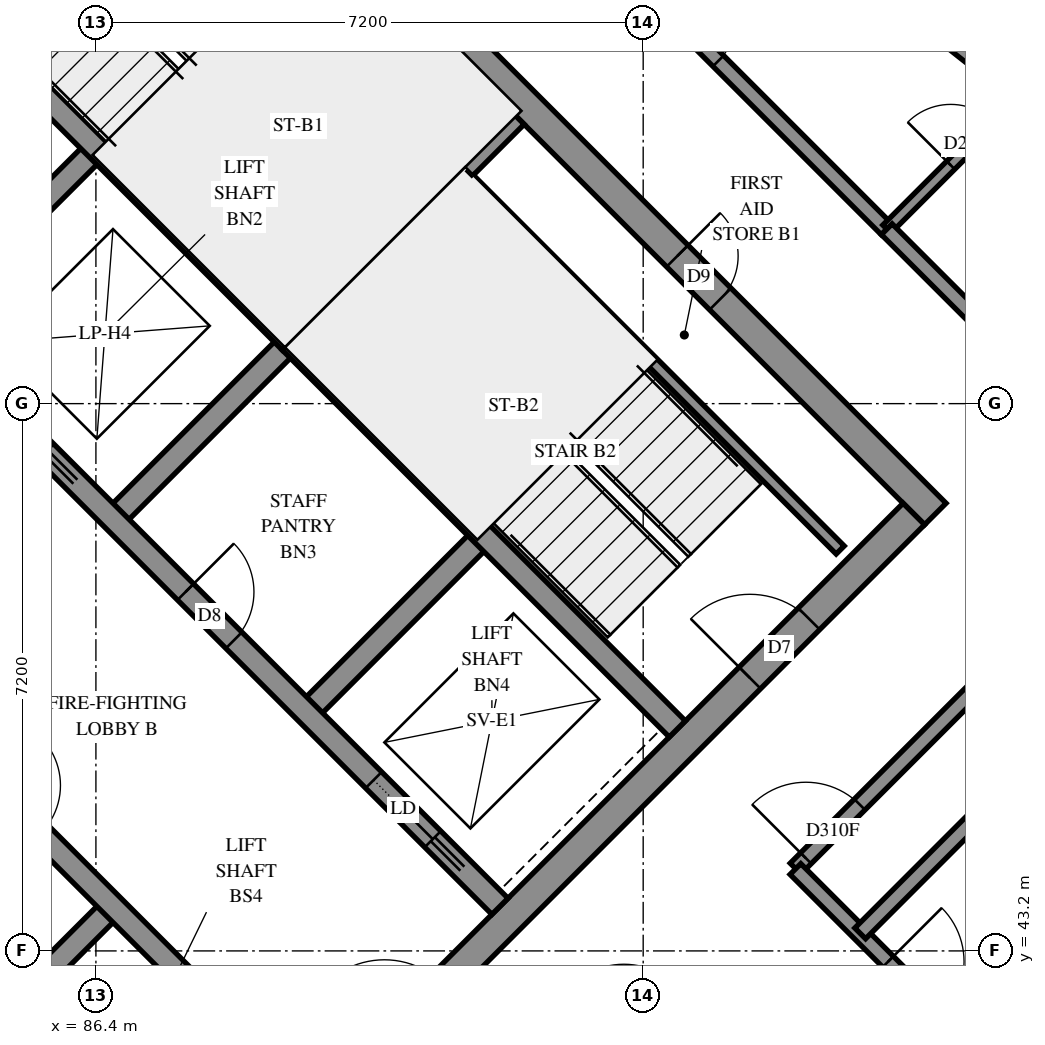
"""IFC4 building model, lengths in metres.
Left out: names, types, materials, properties, quantities, classifications, styles, units other than length and angle.
Written with IfcOpenShell. Run it as: python <this file> out.ifc"""

import sys

from ifc_helpers import new_model, si_unit, direction, frame, frame_2d, origin, place, context, subcontext, project, spatial, polyline, rectangle, outline, extrude, element, fill, save


model = new_model("IFC4")
c1 = context("Model", 3, precision=1e-05, world=origin(), true_north=direction((0.0, 1.0)))
c2 = subcontext(c1, "Body", "Model", "MODEL_VIEW")
j1 = project(units=[si_unit("LENGTHUNIT", "METRE"), si_unit("PLANEANGLEUNIT", "RADIAN")], contexts=[c1])
p1 = place(None, origin())
s1 = spatial("IfcSite", under=j1, at=p1, CompositionType="ELEMENT")
p2 = place(p1, origin())
s2 = spatial("IfcBuilding", under=s1, at=p2, CompositionType="ELEMENT")
p3 = place(p2, frame((0.0, 0.0, 254.0)))
s3 = spatial("IfcBuildingStorey", under=s2, at=p3, CompositionType="ELEMENT", Elevation=254.0)
p4 = place(p3, frame((76.23, 49.231, -0.3), z_axis=(0.0, 0.0, 1.0), x_axis=(0.7071034917, -0.7071100706, 0.0)))
e1 = element("IfcWall", 1, at=p4, inside=s3, PredefinedType="SHEAR", context=c2, shape_type="SweptSolid", body=[
    extrude(rectangle(XDim=15.2, YDim=0.4, at=frame_2d((7.6, 0.0))), origin(), (0.0, 0.0, 1.0), 2.7),
])
p5 = place(p3, frame((86.695, 59.696, -0.3), z_axis=(0.0, 0.0, 1.0), x_axis=(0.7071100706, -0.7071034917, 0.0)))
e2 = element("IfcWall", 2, at=p5, inside=s3, PredefinedType="SHEAR", context=c2, shape_type="SweptSolid", body=[
    extrude(rectangle(XDim=15.2, YDim=0.4, at=frame_2d((7.6, 0.0))), origin(), (0.0, 0.0, 1.0), 2.7),
])
p6 = place(p5, frame((10.4, 0.0, 0.3)))
e3 = element("IfcOpeningElement", 3, at=p6, cuts=e2, PredefinedType="OPENING", context=c2, shape_type="SweptSolid", body=[
    extrude(rectangle(XDim=0.8, YDim=2.1, at=frame_2d((0.4, 1.05))), frame((0.0, 0.21, 0.0), z_axis=(0.0, -1.0, 0.0), x_axis=(1.0, 0.0, 0.0)), (0.0, 0.0, 1.0), 0.42),
])
p7 = place(p3, frame((76.513, 49.231, -0.3), z_axis=(0.0, 0.0, 1.0), x_axis=(0.7071067812, 0.7071067812, 0.0)))
e4 = element("IfcWall", 4, at=p7, inside=s3, PredefinedType="SHEAR", context=c2, shape_type="SweptSolid", body=[
    extrude(rectangle(XDim=14.4, YDim=0.4, at=frame_2d((7.2, 0.0))), origin(), (0.0, 0.0, 1.0), 2.7),
])
p8 = place(p7, frame((4.55, 0.0, 0.3)))
e5 = element("IfcOpeningElement", 5, at=p8, cuts=e4, PredefinedType="OPENING", context=c2, shape_type="SweptSolid", body=[
    extrude(rectangle(XDim=1.1, YDim=2.1, at=frame_2d((0.55, 1.05))), frame((0.0, 0.21, 0.0), z_axis=(0.0, -1.0, 0.0), x_axis=(1.0, 0.0, 0.0)), (0.0, 0.0, 1.0), 0.42),
])
p9 = place(p7, frame((11.35, 0.0, 0.3)))
e6 = element("IfcOpeningElement", 6, at=p9, cuts=e4, PredefinedType="OPENING", context=c2, shape_type="SweptSolid", body=[
    extrude(rectangle(XDim=1.1, YDim=2.1, at=frame_2d((0.55, 1.05))), frame((0.0, 0.21, 0.0), z_axis=(0.0, -1.0, 0.0), x_axis=(1.0, 0.0, 0.0)), (0.0, 0.0, 1.0), 0.42),
])
p10 = place(p3, frame((86.978, 38.766, -0.3), z_axis=(0.0, 0.0, 1.0), x_axis=(0.7071067812, 0.7071067812, 0.0)))
e7 = element("IfcWall", 7, at=p10, inside=s3, PredefinedType="SHEAR", context=c2, shape_type="SweptSolid", body=[
    extrude(rectangle(XDim=14.4, YDim=0.4, at=frame_2d((7.2, 0.0))), origin(), (0.0, 0.0, 1.0), 2.7),
])
p11 = place(p10, frame((4.55, 0.0, 0.3)))
e8 = element("IfcOpeningElement", 8, at=p11, cuts=e7, PredefinedType="OPENING", context=c2, shape_type="SweptSolid", body=[
    extrude(rectangle(XDim=1.1, YDim=2.1, at=frame_2d((0.55, 1.05))), frame((0.0, 0.21, 0.0), z_axis=(0.0, -1.0, 0.0), x_axis=(1.0, 0.0, 0.0)), (0.0, 0.0, 1.0), 0.42),
])
p12 = place(p10, frame((11.35, 0.0, 0.3)))
e9 = element("IfcOpeningElement", 9, at=p12, cuts=e7, PredefinedType="OPENING", context=c2, shape_type="SweptSolid", body=[
    extrude(rectangle(XDim=1.1, YDim=2.1, at=frame_2d((0.55, 1.05))), frame((0.0, 0.21, 0.0), z_axis=(0.0, -1.0, 0.0), x_axis=(1.0, 0.0, 0.0)), (0.0, 0.0, 1.0), 0.42),
])
p13 = place(p3, frame((84.079, 51.423, 0.0), z_axis=(0.0, 0.0, 1.0), x_axis=(0.7071219326, 0.7070916295, 0.0)))
e10 = element("IfcWall", 10, at=p13, inside=s3, PredefinedType="SOLIDWALL", context=c2, shape_type="SweptSolid", body=[
    extrude(rectangle(XDim=3.3, YDim=0.3, at=frame_2d((1.65, 0.0))), origin(), (0.0, 0.0, 1.0), 3.1),
])
p14 = place(p3, frame((86.625, 48.878, 0.0), z_axis=(0.0, 0.0, 1.0), x_axis=(0.7071067812, 0.7071067812, 0.0)))
e11 = element("IfcWall", 11, at=p14, inside=s3, PredefinedType="SOLIDWALL", context=c2, shape_type="SweptSolid", body=[
    extrude(rectangle(XDim=3.3, YDim=0.3, at=frame_2d((1.65, 0.0))), origin(), (0.0, 0.0, 1.0), 3.1),
])
p15 = place(p3, frame((84.291, 41.453, 0.0), z_axis=(0.0, 0.0, 1.0), x_axis=(0.7071067812, 0.7071067812, 0.0)))
e12 = element("IfcWall", 12, at=p15, inside=s3, PredefinedType="SOLIDWALL", context=c2, shape_type="SweptSolid", body=[
    extrude(rectangle(XDim=3.3, YDim=0.3, at=frame_2d((1.65, 0.0))), origin(), (0.0, 0.0, 1.0), 3.1),
])
p16 = place(p3, frame((89.17, 46.332, 0.0), z_axis=(0.0, 0.0, 1.0), x_axis=(0.7071067812, 0.7071067812, 0.0)))
e13 = element("IfcWall", 13, at=p16, inside=s3, PredefinedType="SOLIDWALL", context=c2, shape_type="SweptSolid", body=[
    extrude(rectangle(XDim=3.3, YDim=0.3, at=frame_2d((1.65, 0.0))), origin(), (0.0, 0.0, 1.0), 3.1),
])
p17 = place(p3, frame((78.988, 51.423, 0.0), z_axis=(0.0, 0.0, 1.0), x_axis=(0.7071067812, -0.7071067812, 0.0)))
e14 = element("IfcWall", 14, at=p17, inside=s3, PredefinedType="SOLIDWALL", context=c2, shape_type="SweptSolid", body=[
    extrude(rectangle(XDim=14.4, YDim=0.3, at=frame_2d((7.2, 0.0))), origin(), (0.0, 0.0, 1.0), 3.1),
])
p18 = place(p17, frame((1.35, 0.0, 0.0)))
e15 = element("IfcOpeningElement", 15, at=p18, cuts=e14, PredefinedType="OPENING", context=c2, shape_type="SweptSolid", body=[
    extrude(rectangle(XDim=0.9, YDim=2.1, at=frame_2d((0.45, 1.05))), frame((0.0, 0.16, 0.0), z_axis=(0.0, -1.0, 0.0), x_axis=(1.0, 0.0, 0.0)), (0.0, 0.0, 1.0), 0.32),
])
p19 = place(p17, frame((4.95, 0.0, 0.0)))
e16 = element("IfcOpeningElement", 16, at=p19, cuts=e14, PredefinedType="OPENING", context=c2, shape_type="SweptSolid", body=[
    extrude(rectangle(XDim=0.9, YDim=2.1, at=frame_2d((0.45, 1.05))), frame((0.0, 0.16, 0.0), z_axis=(0.0, -1.0, 0.0), x_axis=(1.0, 0.0, 0.0)), (0.0, 0.0, 1.0), 0.32),
])
p20 = place(p17, frame((8.55, 0.0, 0.0)))
e17 = element("IfcOpeningElement", 17, at=p20, cuts=e14, PredefinedType="OPENING", context=c2, shape_type="SweptSolid", body=[
    extrude(rectangle(XDim=0.9, YDim=2.1, at=frame_2d((0.45, 1.05))), frame((0.0, 0.16, 0.0), z_axis=(0.0, -1.0, 0.0), x_axis=(1.0, 0.0, 0.0)), (0.0, 0.0, 1.0), 0.32),
])
p21 = place(p17, frame((12.05, 0.0, 0.0)))
e18 = element("IfcOpeningElement", 18, at=p21, cuts=e14, PredefinedType="OPENING", context=c2, shape_type="SweptSolid", body=[
    extrude(rectangle(XDim=1.1, YDim=2.1, at=frame_2d((0.55, 1.05))), frame((0.0, 0.16, 0.0), z_axis=(0.0, -1.0, 0.0), x_axis=(1.0, 0.0, 0.0)), (0.0, 0.0, 1.0), 0.32),
])
p22 = place(p3, frame((81.534, 53.969, 0.0), z_axis=(0.0, 0.0, 1.0), x_axis=(0.707103309, -0.7071102534, 0.0)))
e19 = element("IfcWall", 19, at=p22, inside=s3, PredefinedType="SOLIDWALL", context=c2, shape_type="SweptSolid", body=[
    extrude(rectangle(XDim=14.4, YDim=0.3, at=frame_2d((7.2, 0.0))), origin(), (0.0, 0.0, 1.0), 3.1),
])
p23 = place(p22, frame((8.55, 0.0, 0.0)))
e20 = element("IfcOpeningElement", 20, at=p23, cuts=e19, PredefinedType="OPENING", context=c2, shape_type="SweptSolid", body=[
    extrude(rectangle(XDim=0.9, YDim=2.1, at=frame_2d((0.45, 1.05))), frame((0.0, 0.16, 0.0), z_axis=(0.0, -1.0, 0.0), x_axis=(1.0, 0.0, 0.0)), (0.0, 0.0, 1.0), 0.32),
])
p24 = place(p22, frame((1.25, 0.0, 0.0)))
e21 = element("IfcOpeningElement", 21, at=p24, cuts=e19, PredefinedType="OPENING", context=c2, shape_type="SweptSolid", body=[
    extrude(rectangle(XDim=1.1, YDim=2.1, at=frame_2d((0.55, 1.05))), frame((0.0, 0.16, 0.0), z_axis=(0.0, -1.0, 0.0), x_axis=(1.0, 0.0, 0.0)), (0.0, 0.0, 1.0), 0.32),
])
p25 = place(p22, frame((4.85, 0.0, 0.0)))
e22 = element("IfcOpeningElement", 22, at=p25, cuts=e19, PredefinedType="OPENING", context=c2, shape_type="SweptSolid", body=[
    extrude(rectangle(XDim=1.1, YDim=2.1, at=frame_2d((0.55, 1.05))), frame((0.0, 0.16, 0.0), z_axis=(0.0, -1.0, 0.0), x_axis=(1.0, 0.0, 0.0)), (0.0, 0.0, 1.0), 0.32),
])
p26 = place(p22, frame((12.05, 0.0, 0.0)))
e23 = element("IfcOpeningElement", 23, at=p26, cuts=e19, PredefinedType="OPENING", context=c2, shape_type="SweptSolid", body=[
    extrude(rectangle(XDim=1.1, YDim=2.1, at=frame_2d((0.55, 1.05))), frame((0.0, 0.16, 0.0), z_axis=(0.0, -1.0, 0.0), x_axis=(1.0, 0.0, 0.0)), (0.0, 0.0, 1.0), 0.32),
])
for number, where, z_axis, x_axis in (
    (24, (83.867, 56.302, 0.0), (0.0, 0.0, 1.0), (0.707, -0.707, 0.0)),
    (25, (88.958, 51.211, 0.0), (0.0, 0.0, 1.0), (0.707, -0.707, 0.0)),
):
    element("IfcWall", number, at=place(p3, frame(where, z_axis=z_axis, x_axis=x_axis)), inside=s3, PredefinedType="SOLIDWALL", context=c2, shape_type="SweptSolid", body=[
        extrude(rectangle(XDim=7.2, YDim=0.3, at=frame_2d((3.6, 0.0))), origin(), (0.0, 0.0, 1.0), 3.1),
    ])
p27 = place(p3, frame((88.958, 51.211, 0.0), z_axis=(0.0, 0.0, 1.0), x_axis=(0.7071067812, 0.7071067812, 0.0)))
e26 = element("IfcWall", 26, at=p27, inside=s3, PredefinedType="SOLIDWALL", context=c2, shape_type="SweptSolid", body=[
    extrude(rectangle(XDim=4.2, YDim=0.3, at=frame_2d((2.1, 0.0))), origin(), (0.0, 0.0, 1.0), 3.1),
])
p28 = place(p3, frame((98.365, 54.765, 0.0), z_axis=(0.0, 0.0, 1.0), x_axis=(-0.7847316147, 0.6198356984, 0.0)))
e27 = element("IfcWall", 27, at=p28, inside=s3, PredefinedType="SOLIDWALL", context=c2, shape_type="SweptSolid", body=[
    extrude(outline(polyline([(-0.026, -0.225), (3.327, -0.225), (3.38, 0.225), (0.026, 0.225), (-0.026, -0.225)])), origin(), (0.0, 0.0, 1.0), 3.1),
])
p29 = place(p28, frame((1.248, 0.0, 0.45)))
e28 = element("IfcOpeningElement", 28, at=p29, cuts=e27, PredefinedType="OPENING", context=c2, shape_type="SweptSolid", body=[
    extrude(rectangle(XDim=1.2, YDim=2.55, at=frame_2d((0.6, 1.275))), frame((0.0, 0.235, 0.0), z_axis=(0.0, -1.0, 0.0), x_axis=(1.0, 0.0, 0.0)), (0.0, 0.0, 1.0), 0.47),
])
p30 = place(p3, frame((91.313, 53.354, 0.0), z_axis=(0.0, 0.0, 1.0), x_axis=(0.7071140275, -0.7070995348, 0.0)))
e29 = element("IfcWall", 29, at=p30, inside=s3, PredefinedType="PARTITIONING", context=c2, shape_type="SweptSolid", body=[
    extrude(rectangle(XDim=6.9, YDim=0.15, at=frame_2d((3.45, 0.0))), origin(), (0.0, 0.0, 1.0), 3.1),
])
p31 = place(p3, frame((95.605, 44.283, 0.0), z_axis=(0.0, 0.0, 1.0), x_axis=(0.7071067812, 0.7071067812, 0.0)))
e30 = element("IfcWall", 30, at=p31, inside=s3, PredefinedType="PARTITIONING", context=c2, shape_type="SweptSolid", body=[
    extrude(rectangle(XDim=6.8, YDim=0.2, at=frame_2d((3.4, 0.0))), origin(), (0.0, 0.0, 1.0), 3.1),
])
p32 = place(p31, frame((0.193, 0.0, 0.0)))
e31 = element("IfcOpeningElement", 31, at=p32, cuts=e30, PredefinedType="OPENING", context=c2, shape_type="SweptSolid", body=[
    extrude(rectangle(XDim=1.0, YDim=2.1, at=frame_2d((0.5, 1.05))), frame((0.0, 0.11, 0.0), z_axis=(0.0, -1.0, 0.0), x_axis=(1.0, 0.0, 0.0)), (0.0, 0.0, 1.0), 0.22),
])
p33 = place(p3, frame((95.603, 44.277, 0.0), z_axis=(0.0, 0.0, 1.0), x_axis=(0.7071067812, -0.7071067812, 0.0)))
e32 = element("IfcWall", 32, at=p33, inside=s3, PredefinedType="PARTITIONING", context=c2, shape_type="SweptSolid", body=[
    extrude(rectangle(XDim=4.797, YDim=0.2, at=frame_2d((2.398, 0.0))), origin(), (0.0, 0.0, 1.0), 3.1),
])
p34 = place(p33, frame((1.723, 0.0, 0.0)))
e33 = element("IfcOpeningElement", 33, at=p34, cuts=e32, PredefinedType="OPENING", context=c2, shape_type="SweptSolid", body=[
    extrude(rectangle(XDim=1.0, YDim=2.1, at=frame_2d((0.5, 1.05))), frame((0.0, 0.11, 0.0), z_axis=(0.0, -1.0, 0.0), x_axis=(1.0, 0.0, 0.0)), (0.0, 0.0, 1.0), 0.22),
])
p35 = place(p3, frame((93.621, 55.875, 0.0), z_axis=(0.0, 0.0, 1.0), x_axis=(0.7071067812, -0.7071067812, 0.0)))
e34 = element("IfcWall", 34, at=p35, inside=s3, PredefinedType="PARTITIONING", context=c2, shape_type="SweptSolid", body=[
    extrude(rectangle(XDim=4.5, YDim=0.2, at=frame_2d((2.25, 0.0))), origin(), (0.0, 0.0, 1.0), 3.1),
])
p36 = place(p35, frame((0.467, 0.0, 0.0)))
e35 = element("IfcOpeningElement", 35, at=p36, cuts=e34, PredefinedType="OPENING", context=c2, shape_type="SweptSolid", body=[
    extrude(rectangle(XDim=0.9, YDim=2.1, at=frame_2d((0.45, 1.05))), frame((0.0, 0.11, 0.0), z_axis=(0.0, -1.0, 0.0), x_axis=(1.0, 0.0, 0.0)), (0.0, 0.0, 1.0), 0.22),
])
p37 = place(p3, frame((96.455, 43.431, 0.0), z_axis=(0.0, 0.0, 1.0), x_axis=(0.7068409254, 0.707372537, 0.0)))
e36 = element("IfcWall", 36, at=p37, inside=s3, PredefinedType="PARTITIONING", context=c2, shape_type="SweptSolid", body=[
    extrude(rectangle(XDim=3.95, YDim=0.2, at=frame_2d((1.975, 0.0))), origin(), (0.0, 0.0, 1.0), 3.1),
])
p38 = place(p3, frame((96.806, 52.696, 0.0), z_axis=(0.0, 0.0, 1.0), x_axis=(0.707085007, 0.7071285547, 0.0)))
e37 = element("IfcWall", 37, at=p38, inside=s3, PredefinedType="PARTITIONING", context=c2, shape_type="SweptSolid", body=[
    extrude(rectangle(XDim=2.296, YDim=0.15, at=frame_2d((1.148, 0.0))), origin(), (0.0, 0.0, 1.0), 3.1),
])
p39 = place(p38, frame((1.189, 0.0, 0.0)))
e38 = element("IfcOpeningElement", 38, at=p39, cuts=e37, PredefinedType="OPENING", context=c2, shape_type="SweptSolid", body=[
    extrude(rectangle(XDim=0.8, YDim=2.1, at=frame_2d((0.4, 1.05))), frame((0.0, 0.085, 0.0), z_axis=(0.0, -1.0, 0.0), x_axis=(1.0, 0.0, 0.0)), (0.0, 0.0, 1.0), 0.17),
])
p40 = place(p3, frame((96.805, 52.695, 0.0), z_axis=(0.0, 0.0, 1.0), x_axis=(0.7073923078, -0.7068211392, 0.0)))
e39 = element("IfcWall", 39, at=p40, inside=s3, PredefinedType="PARTITIONING", context=c2, shape_type="SweptSolid", body=[
    extrude(rectangle(XDim=1.751, YDim=0.2, at=frame_2d((0.875, 0.0))), origin(), (0.0, 0.0, 1.0), 3.1),
])
p41 = place(p6, origin())
e40 = element("IfcDoor", 40, at=p41, inside=s3, OperationType="SINGLE_SWING_RIGHT", PredefinedType="DOOR", context=c2, shape_type="SweptSolid", body=[
    extrude(rectangle(XDim=0.8, YDim=2.1, at=frame_2d((0.4, 1.05))), frame((0.0, 0.025, 0.0), z_axis=(0.0, -1.0, 0.0), x_axis=(1.0, 0.0, 0.0)), (0.0, 0.0, 1.0), 0.05),
])
fill(e3, e40)
p42 = place(p12, origin())
e41 = element("IfcDoor", 41, at=p42, inside=s3, OperationType="SINGLE_SWING_RIGHT", PredefinedType="DOOR", context=c2, shape_type="SweptSolid", body=[
    extrude(rectangle(XDim=1.1, YDim=2.1, at=frame_2d((0.55, 1.05))), frame((0.0, 0.025, 0.0), z_axis=(0.0, -1.0, 0.0), x_axis=(1.0, 0.0, 0.0)), (0.0, 0.0, 1.0), 0.05),
])
fill(e9, e41)
p43 = place(p23, origin())
e42 = element("IfcDoor", 42, at=p43, inside=s3, OperationType="SINGLE_SWING_LEFT", PredefinedType="DOOR", context=c2, shape_type="SweptSolid", body=[
    extrude(rectangle(XDim=0.9, YDim=2.1, at=frame_2d((0.45, 1.05))), frame((0.0, 0.025, 0.0), z_axis=(0.0, -1.0, 0.0), x_axis=(1.0, 0.0, 0.0)), (0.0, 0.0, 1.0), 0.05),
])
fill(e20, e42)
p44 = place(p26, origin())
e43 = element("IfcDoor", 43, at=p44, inside=s3, OperationType="SLIDING_TO_RIGHT", PredefinedType="DOOR", context=c2, shape_type="SweptSolid", body=[
    extrude(rectangle(XDim=1.1, YDim=2.1, at=frame_2d((0.55, 1.05))), frame((0.0, 0.025, 0.0), z_axis=(0.0, -1.0, 0.0), x_axis=(1.0, 0.0, 0.0)), (0.0, 0.0, 1.0), 0.05),
])
fill(e23, e43)
p45 = place(p32, origin())
e44 = element("IfcDoor", 44, at=p45, inside=s3, OperationType="SINGLE_SWING_LEFT", PredefinedType="DOOR", context=c2, shape_type="SweptSolid", body=[
    extrude(rectangle(XDim=1.0, YDim=2.1, at=frame_2d((0.5, 1.05))), frame((0.0, 0.025, 0.0), z_axis=(0.0, -1.0, 0.0), x_axis=(1.0, 0.0, 0.0)), (0.0, 0.0, 1.0), 0.05),
])
fill(e31, e44)
p46 = place(p36, origin())
e45 = element("IfcDoor", 45, at=p46, inside=s3, OperationType="SINGLE_SWING_LEFT", PredefinedType="DOOR", context=c2, shape_type="SweptSolid", body=[
    extrude(rectangle(XDim=0.9, YDim=2.1, at=frame_2d((0.45, 1.05))), frame((0.0, 0.025, 0.0), z_axis=(0.0, -1.0, 0.0), x_axis=(1.0, 0.0, 0.0)), (0.0, 0.0, 1.0), 0.05),
])
fill(e35, e45)
p47 = place(p39, origin())
e46 = element("IfcDoor", 46, at=p47, inside=s3, OperationType="SINGLE_SWING_RIGHT", PredefinedType="DOOR", context=c2, shape_type="SweptSolid", body=[
    extrude(rectangle(XDim=0.8, YDim=2.1, at=frame_2d((0.4, 1.05))), frame((0.0, 0.025, 0.0), z_axis=(0.0, -1.0, 0.0), x_axis=(1.0, 0.0, 0.0)), (0.0, 0.0, 1.0), 0.05),
])
fill(e38, e46)
p48 = place(p34, origin())
e47 = element("IfcDoor", 47, at=p48, inside=s3, OperationType="SINGLE_SWING_RIGHT", PredefinedType="DOOR", context=c2, shape_type="SweptSolid", body=[
    extrude(rectangle(XDim=1.0, YDim=2.1, at=frame_2d((0.5, 1.05))), frame((0.0, 0.025, 0.0), z_axis=(0.0, -1.0, 0.0), x_axis=(1.0, 0.0, 0.0)), (0.0, 0.0, 1.0), 0.05),
])
fill(e33, e47)
save(model, sys.argv[1])
